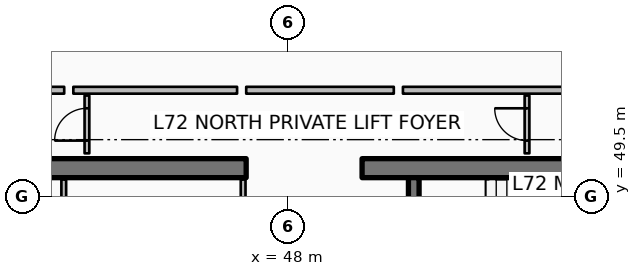
"""IFC4 building model, lengths in metres.
Left out: names, types, materials, properties, quantities, classifications, styles, units other than length and angle.
Written with IfcOpenShell. Run it as: python <this file> out.ifc"""

import sys

from ifc_helpers import new_model, si_unit, direction, frame, frame_2d, origin, place, context, subcontext, project, spatial, rectangle, extrude, element, fill, save


model = new_model("IFC4")
c1 = context("Model", 3, precision=1e-05, world=origin(), true_north=direction((0.0, 1.0)))
c2 = subcontext(c1, "Body", "Model", "MODEL_VIEW")
j1 = project(units=[si_unit("LENGTHUNIT", "METRE"), si_unit("PLANEANGLEUNIT", "RADIAN")], contexts=[c1])
p1 = place(None, origin())
s1 = spatial("IfcSite", under=j1, at=p1, CompositionType="ELEMENT")
p2 = place(p1, origin())
s2 = spatial("IfcBuilding", under=s1, at=p2, CompositionType="ELEMENT")
p3 = place(p2, frame((0.0, 0.0, 286.75)))
s3 = spatial("IfcBuildingStorey", under=s2, at=p3, CompositionType="ELEMENT", Elevation=286.75)
p4 = place(p3, frame((37.3, 50.25, 0.0), z_axis=(0.0, 0.0, 1.0), x_axis=(1.0, 0.0, 0.0)))
e1 = element("IfcWall", 1, at=p4, inside=s3, PredefinedType="SHEAR", context=c2, shape_type="SweptSolid", body=[
    extrude(rectangle(XDim=9.6, YDim=0.5, at=frame_2d((4.8, 0.0))), origin(), (0.0, 0.0, 1.0), 3.85),
])
p5 = place(p3, frame((49.95, 50.25, 0.0), z_axis=(0.0, 0.0, 1.0), x_axis=(1.0, 0.0, 0.0)))
e2 = element("IfcWall", 2, at=p5, inside=s3, PredefinedType="SHEAR", context=c2, shape_type="SweptSolid", body=[
    extrude(rectangle(XDim=9.6, YDim=0.5, at=frame_2d((4.8, 0.0))), origin(), (0.0, 0.0, 1.0), 3.85),
])
p6 = place(p3, frame((51.31, 46.5, 0.0), z_axis=(0.0, 0.0, 1.0), x_axis=(0.0, 1.0, 0.0)))
e3 = element("IfcWall", 3, at=p6, inside=s3, PredefinedType="SHEAR", context=c2, shape_type="SweptSolid", body=[
    extrude(rectangle(XDim=3.5, YDim=0.28, at=frame_2d((1.75, 0.0))), origin(), (0.0, 0.0, 1.0), 3.85),
])
for number, where, z_axis, x_axis in (
    (4, (46.82, 47.92, 0.0), (0.0, 0.0, 1.0), (0.0, 1.0, 0.0)),
    (5, (42.1, 47.92, 0.0), (0.0, 0.0, 1.0), (0.0, 1.0, 0.0)),
):
    element("IfcWall", number, at=place(p3, frame(where, z_axis=z_axis, x_axis=x_axis)), inside=s3, PredefinedType="PARTITIONING", context=c2, shape_type="SweptSolid", body=[
        extrude(rectangle(XDim=2.03, YDim=0.125, at=frame_2d((1.015, 0.0))), origin(), (0.0, 0.0, 1.0), 3.03),
    ])
p7 = place(p3, frame((42.71, 50.64, 0.0), z_axis=(0.0, 0.0, 1.0), x_axis=(0.0, 1.0, 0.0)))
e6 = element("IfcWall", 6, at=p7, inside=s3, PredefinedType="PARTITIONING", context=c2, shape_type="SweptSolid", body=[
    extrude(rectangle(XDim=1.52, YDim=0.125, at=frame_2d((0.76, 0.0))), origin(), (0.0, 0.0, 1.0), 2.957),
])
p8 = place(p7, frame((0.335, 0.0, 0.0)))
e7 = element("IfcOpeningElement", 7, at=p8, cuts=e6, PredefinedType="OPENING", context=c2, shape_type="SweptSolid", body=[
    extrude(rectangle(XDim=0.85, YDim=2.06, at=frame_2d((0.425, 1.03))), frame((0.0, 0.073, 0.0), z_axis=(0.0, -1.0, 0.0), x_axis=(1.0, 0.0, 0.0)), (0.0, 0.0, 1.0), 0.145),
])
p9 = place(p3, frame((54.29, 50.64, 0.0), z_axis=(0.0, 0.0, 1.0), x_axis=(0.0, 1.0, 0.0)))
e8 = element("IfcWall", 8, at=p9, inside=s3, PredefinedType="PARTITIONING", context=c2, shape_type="SweptSolid", body=[
    extrude(rectangle(XDim=1.52, YDim=0.125, at=frame_2d((0.76, 0.0))), origin(), (0.0, 0.0, 1.0), 3.03),
])
p10 = place(p9, frame((0.335, 0.0, 0.0)))
e9 = element("IfcOpeningElement", 9, at=p10, cuts=e8, PredefinedType="OPENING", context=c2, shape_type="SweptSolid", body=[
    extrude(rectangle(XDim=0.85, YDim=2.06, at=frame_2d((0.425, 1.03))), frame((0.0, 0.073, 0.0), z_axis=(0.0, -1.0, 0.0), x_axis=(1.0, 0.0, 0.0)), (0.0, 0.0, 1.0), 0.145),
])
p11 = place(p3, frame((56.0, 52.3, 0.0), z_axis=(0.0, 0.0, 1.0), x_axis=(-1.0, 0.0, 0.0)))
e10 = element("IfcWall", 10, at=p11, inside=s3, PredefinedType="PARTITIONING", context=c2, shape_type="SweptSolid", body=[
    extrude(rectangle(XDim=4.975, YDim=0.18, at=frame_2d((2.488, 0.0))), origin(), (0.0, 0.0, 1.0), 2.957),
])
p12 = place(p3, frame((50.785, 52.3, 0.0), z_axis=(0.0, 0.0, 1.0), x_axis=(-1.0, 0.0, 0.0)))
e11 = element("IfcWall", 11, at=p12, inside=s3, PredefinedType="PARTITIONING", context=c2, shape_type="SweptSolid", body=[
    extrude(rectangle(XDim=3.884, YDim=0.18, at=frame_2d((1.942, 0.0))), origin(), (0.0, 0.0, 1.0), 2.957),
])
p13 = place(p3, frame((46.661, 52.3, 0.0), z_axis=(0.0, 0.0, 1.0), x_axis=(-1.0, 0.0, 0.0)))
e12 = element("IfcWall", 12, at=p13, inside=s3, PredefinedType="PARTITIONING", context=c2, shape_type="SweptSolid", body=[
    extrude(rectangle(XDim=4.309, YDim=0.18, at=frame_2d((2.155, 0.0))), origin(), (0.0, 0.0, 1.0), 2.957),
])
p14 = place(p3, frame((42.112, 52.3, 0.0), z_axis=(0.0, 0.0, 1.0), x_axis=(-1.0, 0.0, 0.0)))
e13 = element("IfcWall", 13, at=p14, inside=s3, PredefinedType="PARTITIONING", context=c2, shape_type="SweptSolid", body=[
    extrude(rectangle(XDim=4.692, YDim=0.18, at=frame_2d((2.346, 0.0))), origin(), (0.0, 0.0, 1.0), 2.957),
])
p15 = place(p8, origin())
e14 = element("IfcDoor", 14, at=p15, inside=s3, OperationType="SINGLE_SWING_LEFT", PredefinedType="DOOR", context=c2, shape_type="SweptSolid", body=[
    extrude(rectangle(XDim=0.85, YDim=2.06, at=frame_2d((0.425, 1.03))), frame((0.0, 0.025, 0.0), z_axis=(0.0, -1.0, 0.0), x_axis=(1.0, 0.0, 0.0)), (0.0, 0.0, 1.0), 0.05),
])
fill(e7, e14)
p16 = place(p10, origin())
e15 = element("IfcDoor", 15, at=p16, inside=s3, OperationType="SINGLE_SWING_RIGHT", PredefinedType="DOOR", context=c2, shape_type="SweptSolid", body=[
    extrude(rectangle(XDim=0.85, YDim=2.06, at=frame_2d((0.425, 1.03))), frame((0.0, 0.025, 0.0), z_axis=(0.0, -1.0, 0.0), x_axis=(1.0, 0.0, 0.0)), (0.0, 0.0, 1.0), 0.05),
])
fill(e9, e15)
save(model, sys.argv[1])
